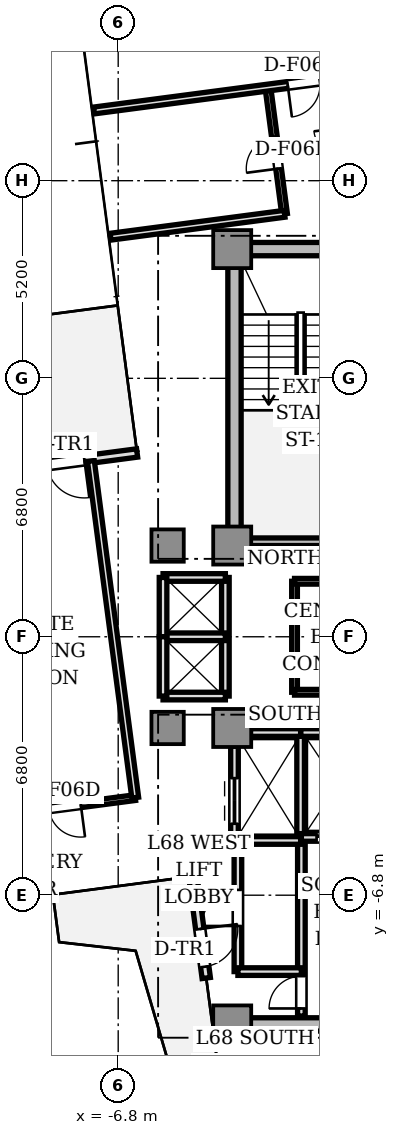
"""IFC4 building model, lengths in metres.
Left out: names, types, materials, properties, quantities, classifications, styles, units other than length and angle.
Written with IfcOpenShell. Run it as: python <this file> out.ifc"""

import sys

from ifc_helpers import new_model, si_unit, direction, frame, frame_2d, origin, origin_2d, place, context, subcontext, project, spatial, rectangle, extrude, source, transform, mapped, element, fill, save


model = new_model("IFC4")
c1 = context("Model", 3, precision=1e-05, world=origin(), true_north=direction((0.0, 1.0)))
c2 = subcontext(c1, "Body", "Model", "MODEL_VIEW")
j1 = project(units=[si_unit("LENGTHUNIT", "METRE"), si_unit("PLANEANGLEUNIT", "RADIAN")], contexts=[c1])
p1 = place(None, origin())
s1 = spatial("IfcSite", under=j1, at=p1, CompositionType="ELEMENT")
p2 = place(p1, origin())
s2 = spatial("IfcBuilding", under=s1, at=p2, CompositionType="ELEMENT")
p3 = place(p2, frame((0.0, 0.0, 244.5)))
s3 = spatial("IfcBuildingStorey", under=s2, at=p3, CompositionType="ELEMENT", Elevation=244.5)
p4 = place(p3, frame((-3.55, 10.2, 0.0), z_axis=(0.0, 0.0, 1.0), x_axis=(1.0, 0.0, 0.0)))
e1 = element("IfcWall", 1, at=p4, inside=s3, PredefinedType="SHEAR", context=c2, shape_type="SweptSolid", body=[
    extrude(rectangle(XDim=7.1, YDim=0.35, at=frame_2d((3.55, 0.0))), origin(), (0.0, 0.0, 1.0), 3.11),
])
p5 = place(p3, frame((-3.74, 2.85, 0.0), z_axis=(0.0, 0.0, 1.0), x_axis=(0.0, 1.0, 0.0)))
e2 = element("IfcWall", 2, at=p5, inside=s3, PredefinedType="SHEAR", context=c2, shape_type="SweptSolid", body=[
    extrude(rectangle(XDim=6.9, YDim=0.35, at=frame_2d((3.45, 0.0))), origin(), (0.0, 0.0, 1.0), 3.11),
])
p6 = place(p3, frame((-3.55, -10.2, 0.0), z_axis=(0.0, 0.0, 1.0), x_axis=(1.0, 0.0, 0.0)))
e3 = element("IfcWall", 3, at=p6, inside=s3, PredefinedType="SHEAR", context=c2, shape_type="SweptSolid", body=[
    extrude(rectangle(XDim=7.1, YDim=0.35, at=frame_2d((3.55, 0.0))), origin(), (0.0, 0.0, 1.0), 3.11),
])
m1 = source(origin(), c2, "Body", "SweptSolid", [
    extrude(rectangle(XDim=1.0, YDim=1.0, at=origin_2d()), origin(), (0.0, 0.0, 1.0), 3.11),
])
for number, where, z_axis, x_axis in (
    (4, (-3.8, 2.4, 0.0), (0.0, 0.0, 1.0), (1.0, 0.0, 0.0)),
    (5, (-3.8, 10.2, 0.0), (0.0, 0.0, 1.0), (1.0, 0.0, 0.0)),
    (6, (-3.8, -2.4, 0.0), (0.0, 0.0, 1.0), (1.0, 0.0, 0.0)),
    (7, (-3.8, -10.2, 0.0), (0.0, 0.0, 1.0), (1.0, 0.0, 0.0)),
):
    element("IfcColumn", number, at=place(p3, frame(where, z_axis=z_axis, x_axis=x_axis)), inside=s3, PredefinedType="COLUMN", context=c2, shape_type="MappedRepresentation", body=[
        mapped(m1, transform((0.0, 0.0, 0.0), scale=1.0)),
    ])
m2 = source(origin(), c2, "Body", "SweptSolid", [
    extrude(rectangle(XDim=0.85, YDim=0.85, at=origin_2d()), origin(), (0.0, 0.0, 1.0), 3.11),
])
for number, where, z_axis, x_axis in (
    (8, (-5.5, 2.4, 0.0), (0.0, 0.0, 1.0), (1.0, 0.0, 0.0)),
    (9, (-5.5, -2.4, 0.0), (0.0, 0.0, 1.0), (1.0, 0.0, 0.0)),
):
    element("IfcColumn", number, at=place(p3, frame(where, z_axis=z_axis, x_axis=x_axis)), inside=s3, PredefinedType="COLUMN", context=c2, shape_type="MappedRepresentation", body=[
        mapped(m2, transform((0.0, 0.0, 0.0), scale=1.0)),
    ])
p7 = place(p3, frame((-6.302, 4.836, 0.0), z_axis=(0.0, 0.0, 1.0), x_axis=(-0.991451525486, -0.130475563272, 0.0)))
e10 = element("IfcWall", 10, at=p7, inside=s3, PredefinedType="STANDARD", context=c2, shape_type="SweptSolid", body=[
    extrude(rectangle(XDim=2.7, YDim=0.22, at=frame_2d((1.35, 0.0))), origin(), (0.0, 0.0, 1.0), 3.11),
])
p8 = place(p7, frame((1.4, 0.0, 0.0)))
e11 = element("IfcOpeningElement", 11, at=p8, cuts=e10, PredefinedType="OPENING", context=c2, shape_type="SweptSolid", body=[
    extrude(rectangle(XDim=1.0, YDim=2.2, at=frame_2d((0.5, 1.1))), frame((0.0, 0.12, 0.0), z_axis=(0.0, -1.0, 0.0), x_axis=(1.0, 0.0, 0.0)), (0.0, 0.0, 1.0), 0.24),
])
p9 = place(p3, frame((-4.836, -6.302, 0.0), z_axis=(0.0, 0.0, 1.0), x_axis=(0.130475563272, -0.991451525486, 0.0)))
e12 = element("IfcWall", 12, at=p9, inside=s3, PredefinedType="STANDARD", context=c2, shape_type="SweptSolid", body=[
    extrude(rectangle(XDim=2.7, YDim=0.22, at=frame_2d((1.35, 0.0))), origin(), (0.0, 0.0, 1.0), 3.11),
])
p10 = place(p9, frame((1.4, 0.0, 0.0)))
e13 = element("IfcOpeningElement", 13, at=p10, cuts=e12, PredefinedType="OPENING", context=c2, shape_type="SweptSolid", body=[
    extrude(rectangle(XDim=1.0, YDim=2.2, at=frame_2d((0.5, 1.1))), frame((0.0, 0.12, 0.0), z_axis=(0.0, -1.0, 0.0), x_axis=(1.0, 0.0, 0.0)), (0.0, 0.0, 1.0), 0.24),
])
p11 = place(p3, frame((-3.72, 2.5, 0.0), z_axis=(0.0, 0.0, 1.0), x_axis=(1.0, 0.0, 0.0)))
e14 = element("IfcWall", 14, at=p11, inside=s3, PredefinedType="SOLIDWALL", context=c2, shape_type="SweptSolid", body=[
    extrude(rectangle(XDim=3.72, YDim=0.2, at=frame_2d((1.86, 0.0))), origin(), (0.0, 0.0, 1.0), 3.11),
])
p12 = place(p3, frame((-1.98, -9.98, 0.0), z_axis=(0.0, 0.0, 1.0), x_axis=(0.0, 1.0, 0.0)))
e15 = element("IfcWall", 15, at=p12, inside=s3, PredefinedType="SOLIDWALL", context=c2, shape_type="SweptSolid", body=[
    extrude(rectangle(XDim=4.66, YDim=0.2, at=frame_2d((2.33, 0.0))), origin(), (0.0, 0.0, 1.0), 2.66),
])
p13 = place(p12, frame((0.2, 0.0, 0.0)))
e16 = element("IfcOpeningElement", 16, at=p13, cuts=e15, PredefinedType="OPENING", context=c2, shape_type="SweptSolid", body=[
    extrude(rectangle(XDim=0.85, YDim=2.1, at=frame_2d((0.425, 1.05))), frame((0.0, 0.11, 0.0), z_axis=(0.0, -1.0, 0.0), x_axis=(1.0, 0.0, 0.0)), (0.0, 0.0, 1.0), 0.22),
])
p14 = place(p3, frame((-2.0, -5.28, 0.0), z_axis=(0.0, 0.0, 1.0), x_axis=(0.0, 1.0, 0.0)))
e17 = element("IfcWall", 17, at=p14, inside=s3, PredefinedType="SOLIDWALL", context=c2, shape_type="SweptSolid", body=[
    extrude(rectangle(XDim=2.78, YDim=0.2, at=frame_2d((1.39, 0.0))), origin(), (0.0, 0.0, 1.0), 2.66),
])
p15 = place(p3, frame((-2.0, -2.52, 0.0), z_axis=(0.0, 0.0, 1.0), x_axis=(1.0, 0.0, 0.0)))
e18 = element("IfcWall", 18, at=p15, inside=s3, PredefinedType="SOLIDWALL", context=c2, shape_type="SweptSolid", body=[
    extrude(rectangle(XDim=1.95, YDim=0.2, at=frame_2d((0.975, 0.0))), origin(), (0.0, 0.0, 1.0), 2.66),
])
p16 = place(p3, frame((-1.98, -5.28, 0.0), z_axis=(0.0, 0.0, 1.0), x_axis=(1.0, 0.0, 0.0)))
e19 = element("IfcWall", 19, at=p16, inside=s3, PredefinedType="SOLIDWALL", context=c2, shape_type="SweptSolid", body=[
    extrude(rectangle(XDim=1.93, YDim=0.2, at=frame_2d((0.965, 0.0))), origin(), (0.0, 0.0, 1.0), 2.66),
])
p17 = place(p16, frame((0.4, 0.0, 0.0)))
e20 = element("IfcOpeningElement", 20, at=p17, cuts=e19, PredefinedType="OPENING", context=c2, shape_type="SweptSolid", body=[
    extrude(rectangle(XDim=1.1, YDim=2.2, at=frame_2d((0.55, 1.1))), frame((0.0, 0.11, 0.0), z_axis=(0.0, -1.0, 0.0), x_axis=(1.0, 0.0, 0.0)), (0.0, 0.0, 1.0), 0.22),
])
p18 = place(p3, frame((-3.32, -2.52, 0.0), z_axis=(0.0, 0.0, 1.0), x_axis=(1.0, 0.0, 0.0)))
e21 = element("IfcWall", 21, at=p18, inside=s3, PredefinedType="SOLIDWALL", context=c2, shape_type="SweptSolid", body=[
    extrude(rectangle(XDim=1.32, YDim=0.2, at=frame_2d((0.66, 0.0))), origin(), (0.0, 0.0, 1.0), 2.66),
])
p19 = place(p3, frame((-3.74, -5.36, 0.0), z_axis=(0.0, 0.0, 1.0), x_axis=(1.0, 0.0, 0.0)))
e22 = element("IfcWall", 22, at=p19, inside=s3, PredefinedType="SOLIDWALL", context=c2, shape_type="SweptSolid", body=[
    extrude(rectangle(XDim=1.74, YDim=0.2, at=frame_2d((0.87, 0.0))), origin(), (0.0, 0.0, 1.0), 2.66),
])
p20 = place(p3, frame((-3.74, -5.36, 0.0), z_axis=(0.0, 0.0, 1.0), x_axis=(0.0, 1.0, 0.0)))
e23 = element("IfcWall", 23, at=p20, inside=s3, PredefinedType="SOLIDWALL", context=c2, shape_type="SweptSolid", body=[
    extrude(rectangle(XDim=2.48, YDim=0.2, at=frame_2d((1.24, 0.0))), origin(), (0.0, 0.0, 1.0), 2.66),
])
p21 = place(p20, frame((0.44, 0.0, 0.0)))
e24 = element("IfcOpeningElement", 24, at=p21, cuts=e23, PredefinedType="OPENING", context=c2, shape_type="SweptSolid", body=[
    extrude(rectangle(XDim=1.2, YDim=2.2, at=frame_2d((0.6, 1.1))), frame((0.0, 0.11, 0.0), z_axis=(0.0, -1.0, 0.0), x_axis=(1.0, 0.0, 0.0)), (0.0, 0.0, 1.0), 0.22),
])
p22 = place(p3, frame((-3.98, -1.56, 0.0), z_axis=(0.0, 0.0, 1.0), x_axis=(0.0, 1.0, 0.0)))
e25 = element("IfcWall", 25, at=p22, inside=s3, PredefinedType="SOLIDWALL", context=c2, shape_type="SweptSolid", body=[
    extrude(rectangle(XDim=3.12, YDim=0.2, at=frame_2d((1.56, 0.0))), origin(), (0.0, 0.0, 1.0), 2.33),
])
for number, where, z_axis, x_axis in (
    (26, (-5.62, 1.56, 0.0), (0.0, 0.0, 1.0), (1.0, 0.0, 0.0)),
    (27, (-5.62, -1.56, 0.0), (0.0, 0.0, 1.0), (1.0, 0.0, 0.0)),
    (28, (-5.62, 0.0, 0.0), (0.0, 0.0, 1.0), (1.0, 0.0, 0.0)),
):
    element("IfcWall", number, at=place(p3, frame(where, z_axis=z_axis, x_axis=x_axis)), inside=s3, PredefinedType="SOLIDWALL", context=c2, shape_type="SweptSolid", body=[
        extrude(rectangle(XDim=1.64, YDim=0.2, at=frame_2d((0.82, 0.0))), origin(), (0.0, 0.0, 1.0), 2.66),
    ])
for number, where, z_axis, x_axis in (
    (29, (-5.62, 0.0, 0.0), (0.0, 0.0, 1.0), (0.0, 1.0, 0.0)),
    (30, (-5.62, -1.56, 0.0), (0.0, 0.0, 1.0), (0.0, 1.0, 0.0)),
):
    element("IfcWall", number, at=place(p3, frame(where, z_axis=z_axis, x_axis=x_axis)), inside=s3, PredefinedType="SOLIDWALL", context=c2, shape_type="SweptSolid", body=[
        extrude(rectangle(XDim=1.56, YDim=0.2, at=frame_2d((0.78, 0.0))), origin(), (0.0, 0.0, 1.0), 2.66),
    ])
p23 = place(p3, frame((-3.65, -8.81, 0.0), z_axis=(0.0, 0.0, 1.0), x_axis=(0.0, 1.0, 0.0)))
e31 = element("IfcWall", 31, at=p23, inside=s3, PredefinedType="SOLIDWALL", context=c2, shape_type="SweptSolid", body=[
    extrude(rectangle(XDim=3.43, YDim=0.2, at=frame_2d((1.715, 0.0))), origin(), (0.0, 0.0, 1.0), 2.66),
])
p24 = place(p23, frame((1.2, 0.0, 0.0)))
e32 = element("IfcOpeningElement", 32, at=p24, cuts=e31, PredefinedType="OPENING", context=c2, shape_type="SweptSolid", body=[
    extrude(rectangle(XDim=0.95, YDim=2.15, at=frame_2d((0.475, 1.075))), frame((0.0, 0.11, 0.0), z_axis=(0.0, -1.0, 0.0), x_axis=(1.0, 0.0, 0.0)), (0.0, 0.0, 1.0), 0.22),
])
p25 = place(p3, frame((-3.65, -8.81, 0.0), z_axis=(0.0, 0.0, 1.0), x_axis=(1.0, 0.0, 0.0)))
e33 = element("IfcWall", 33, at=p25, inside=s3, PredefinedType="SOLIDWALL", context=c2, shape_type="SweptSolid", body=[
    extrude(rectangle(XDim=1.67, YDim=0.2, at=frame_2d((0.835, 0.0))), origin(), (0.0, 0.0, 1.0), 2.66),
])
p26 = place(p3, frame((-2.16, -1.46, 0.0), z_axis=(0.0, 0.0, 1.0), x_axis=(0.0, 1.0, 0.0)))
e34 = element("IfcWall", 34, at=p26, inside=s3, PredefinedType="PARTITIONING", context=c2, shape_type="SweptSolid", body=[
    extrude(rectangle(XDim=2.92, YDim=0.15, at=frame_2d((1.46, 0.0))), origin(), (0.0, 0.0, 1.0), 2.66),
])
p27 = place(p3, frame((-2.16, 1.46, 0.0), z_axis=(0.0, 0.0, 1.0), x_axis=(1.0, 0.0, 0.0)))
e35 = element("IfcWall", 35, at=p27, inside=s3, PredefinedType="PARTITIONING", context=c2, shape_type="SweptSolid", body=[
    extrude(rectangle(XDim=4.32, YDim=0.15, at=frame_2d((2.16, 0.0))), origin(), (0.0, 0.0, 1.0), 2.66),
])
p28 = place(p27, frame((1.73, 0.0, 0.0)))
e36 = element("IfcOpeningElement", 36, at=p28, cuts=e35, PredefinedType="OPENING", context=c2, shape_type="SweptSolid", body=[
    extrude(rectangle(XDim=0.85, YDim=2.1, at=frame_2d((0.425, 1.05))), frame((0.0, 0.085, 0.0), z_axis=(0.0, -1.0, 0.0), x_axis=(1.0, 0.0, 0.0)), (0.0, 0.0, 1.0), 0.17),
])
p29 = place(p3, frame((-2.16, -1.46, 0.0), z_axis=(0.0, 0.0, 1.0), x_axis=(1.0, 0.0, 0.0)))
e37 = element("IfcWall", 37, at=p29, inside=s3, PredefinedType="PARTITIONING", context=c2, shape_type="SweptSolid", body=[
    extrude(rectangle(XDim=4.32, YDim=0.15, at=frame_2d((2.16, 0.0))), origin(), (0.0, 0.0, 1.0), 2.66),
])
p30 = place(p29, frame((1.73, 0.0, 0.0)))
e38 = element("IfcOpeningElement", 38, at=p30, cuts=e37, PredefinedType="OPENING", context=c2, shape_type="SweptSolid", body=[
    extrude(rectangle(XDim=0.85, YDim=2.1, at=frame_2d((0.425, 1.05))), frame((0.0, 0.085, 0.0), z_axis=(0.0, -1.0, 0.0), x_axis=(1.0, 0.0, 0.0)), (0.0, 0.0, 1.0), 0.17),
])
for number, where, z_axis, x_axis in (
    (39, (-2.16, 0.66, 0.0), (0.0, 0.0, 1.0), (1.0, 0.0, 0.0)),
    (40, (-2.16, -0.66, 0.0), (0.0, 0.0, 1.0), (1.0, 0.0, 0.0)),
):
    element("IfcWall", number, at=place(p3, frame(where, z_axis=z_axis, x_axis=x_axis)), inside=s3, PredefinedType="PARTITIONING", context=c2, shape_type="SweptSolid", body=[
        extrude(rectangle(XDim=4.32, YDim=0.15, at=frame_2d((2.16, 0.0))), origin(), (0.0, 0.0, 1.0), 2.66),
    ])
p31 = place(p3, frame((-2.423, 11.129, 0.0), z_axis=(0.0, 0.0, 1.0), x_axis=(-0.130526150873, 0.991444866817, 0.0)))
e41 = element("IfcWall", 41, at=p31, inside=s3, PredefinedType="PARTITIONING", context=c2, shape_type="SweptSolid", body=[
    extrude(rectangle(XDim=3.35, YDim=0.15, at=frame_2d((1.675, 0.0))), origin(), (0.0, 0.0, 1.0), 2.66),
])
p32 = place(p31, frame((1.2, 0.0, 0.0)))
e42 = element("IfcOpeningElement", 42, at=p32, cuts=e41, PredefinedType="OPENING", context=c2, shape_type="SweptSolid", body=[
    extrude(rectangle(XDim=0.85, YDim=2.1, at=frame_2d((0.425, 1.05))), frame((0.0, 0.085, 0.0), z_axis=(0.0, -1.0, 0.0), x_axis=(1.0, 0.0, 0.0)), (0.0, 0.0, 1.0), 0.17),
])
p33 = place(p3, frame((-2.423, 11.129, 0.0), z_axis=(0.0, 0.0, 1.0), x_axis=(-0.991447274637, -0.130507860355, 0.0)))
e43 = element("IfcWall", 43, at=p33, inside=s3, PredefinedType="PARTITIONING", context=c2, shape_type="SweptSolid", body=[
    extrude(rectangle(XDim=4.617, YDim=0.18, at=frame_2d((2.309, 0.0))), origin(), (0.0, 0.0, 1.0), 2.66),
])
p34 = place(p3, frame((3.601, 15.301, 0.0), z_axis=(0.0, 0.0, 1.0), x_axis=(-0.991446382373, -0.130514638561, 0.0)))
e44 = element("IfcWall", 44, at=p34, inside=s3, PredefinedType="PARTITIONING", context=c2, shape_type="SweptSolid", body=[
    extrude(rectangle(XDim=11.134, YDim=0.18, at=frame_2d((5.567, 0.0))), origin(), (0.0, 0.0, 1.0), 2.66),
])
p35 = place(p34, frame((5.142, 0.0, 0.0)))
e45 = element("IfcOpeningElement", 45, at=p35, cuts=e44, PredefinedType="OPENING", context=c2, shape_type="SweptSolid", body=[
    extrude(rectangle(XDim=0.85, YDim=2.1, at=frame_2d((0.425, 1.05))), frame((0.0, 0.1, 0.0), z_axis=(0.0, -1.0, 0.0), x_axis=(1.0, 0.0, 0.0)), (0.0, 0.0, 1.0), 0.2),
])
p36 = place(p3, frame((-6.352, -4.232, 0.0), z_axis=(0.0, 0.0, 1.0), x_axis=(-0.991446823881, -0.130511284629, 0.0)))
e46 = element("IfcWall", 46, at=p36, inside=s3, PredefinedType="PARTITIONING", context=c2, shape_type="SweptSolid", body=[
    extrude(rectangle(XDim=8.343, YDim=0.15, at=frame_2d((4.171, 0.0))), origin(), (0.0, 0.0, 1.0), 2.66),
])
p37 = place(p36, frame((1.444, 0.0, 0.0)))
e47 = element("IfcOpeningElement", 47, at=p37, cuts=e46, PredefinedType="OPENING", context=c2, shape_type="SweptSolid", body=[
    extrude(rectangle(XDim=0.85, YDim=2.1, at=frame_2d((0.425, 1.05))), frame((0.0, 0.085, 0.0), z_axis=(0.0, -1.0, 0.0), x_axis=(1.0, 0.0, 0.0)), (0.0, 0.0, 1.0), 0.17),
])
p38 = place(p36, frame((4.641, 0.0, 0.0)))
e48 = element("IfcOpeningElement", 48, at=p38, cuts=e46, PredefinedType="OPENING", context=c2, shape_type="SweptSolid", body=[
    extrude(rectangle(XDim=0.85, YDim=2.1, at=frame_2d((0.425, 1.05))), frame((0.0, 0.085, 0.0), z_axis=(0.0, -1.0, 0.0), x_axis=(1.0, 0.0, 0.0)), (0.0, 0.0, 1.0), 0.17),
])
p39 = place(p3, frame((-7.518, 4.625, 0.0), z_axis=(0.0, 0.0, 1.0), x_axis=(0.130540045477, -0.991443037459, 0.0)))
e49 = element("IfcWall", 49, at=p39, inside=s3, PredefinedType="PARTITIONING", context=c2, shape_type="SweptSolid", body=[
    extrude(rectangle(XDim=8.934, YDim=0.18, at=frame_2d((4.467, 0.0))), origin(), (0.0, 0.0, 1.0), 2.66),
])
p40 = place(p3, frame((-4.038, -11.979, 0.0), z_axis=(0.0, 0.0, 1.0), x_axis=(0.991446382373, 0.130514638561, 0.0)))
e50 = element("IfcWall", 50, at=p40, inside=s3, PredefinedType="PARTITIONING", context=c2, shape_type="SweptSolid", body=[
    extrude(rectangle(XDim=11.134, YDim=0.15, at=frame_2d((5.567, 0.0))), origin(), (0.0, 0.0, 1.0), 2.66),
])
p41 = place(p40, frame((4.767, 0.0, 0.0)))
e51 = element("IfcOpeningElement", 51, at=p41, cuts=e50, PredefinedType="OPENING", context=c2, shape_type="SweptSolid", body=[
    extrude(rectangle(XDim=1.6, YDim=2.25, at=frame_2d((0.8, 1.125))), frame((0.0, 0.085, 0.0), z_axis=(0.0, -1.0, 0.0), x_axis=(1.0, 0.0, 0.0)), (0.0, 0.0, 1.0), 0.17),
])
m3 = source(origin(), c2, "Body", "SweptSolid", [
    extrude(rectangle(XDim=1.0, YDim=0.05, at=origin_2d()), origin(), (0.0, 0.0, 1.0), 2.2),
])
p42 = place(p8, frame((0.5, 0.0, 0.0)))
e52 = element("IfcDoor", 52, at=p42, inside=s3, OperationType="SINGLE_SWING_LEFT", PredefinedType="DOOR", context=c2, shape_type="MappedRepresentation", body=[
    mapped(m3, transform((0.0, 0.0, 0.0), scale=1.0)),
])
fill(e11, e52)
p43 = place(p10, frame((0.5, 0.0, 0.0)))
e53 = element("IfcDoor", 53, at=p43, inside=s3, OperationType="SINGLE_SWING_LEFT", PredefinedType="DOOR", context=c2, shape_type="MappedRepresentation", body=[
    mapped(m3, transform((0.0, 0.0, 0.0), scale=1.0)),
])
fill(e13, e53)
m4 = source(origin(), c2, "Body", "SweptSolid", [
    extrude(rectangle(XDim=0.85, YDim=0.05, at=origin_2d()), origin(), (0.0, 0.0, 1.0), 2.1),
])
p44 = place(p13, frame((0.425, 0.0, 0.0)))
e54 = element("IfcDoor", 54, at=p44, inside=s3, OperationType="SINGLE_SWING_LEFT", PredefinedType="DOOR", context=c2, shape_type="MappedRepresentation", body=[
    mapped(m4, transform((0.0, 0.0, 0.0), scale=1.0)),
])
fill(e16, e54)
m5 = source(origin(), c2, "Body", "SweptSolid", [
    extrude(rectangle(XDim=1.1, YDim=0.05, at=origin_2d()), origin(), (0.0, 0.0, 1.0), 2.2),
])
p45 = place(p17, frame((0.55, 0.0, 0.0)))
e55 = element("IfcDoor", 55, at=p45, inside=s3, OperationType="DOUBLE_DOOR_SLIDING", PredefinedType="DOOR", context=c2, shape_type="MappedRepresentation", body=[
    mapped(m5, transform((0.0, 0.0, 0.0), scale=1.0)),
])
fill(e20, e55)
m6 = source(origin(), c2, "Body", "SweptSolid", [
    extrude(rectangle(XDim=1.2, YDim=0.05, at=origin_2d()), origin(), (0.0, 0.0, 1.0), 2.2),
])
p46 = place(p21, frame((0.6, 0.0, 0.0)))
e56 = element("IfcDoor", 56, at=p46, inside=s3, OperationType="DOUBLE_DOOR_SLIDING", PredefinedType="DOOR", context=c2, shape_type="MappedRepresentation", body=[
    mapped(m6, transform((0.0, 0.0, 0.0), scale=1.0)),
])
fill(e24, e56)
m7 = source(origin(), c2, "Body", "SweptSolid", [
    extrude(rectangle(XDim=0.95, YDim=0.05, at=origin_2d()), origin(), (0.0, 0.0, 1.0), 2.15),
])
p47 = place(p24, frame((0.475, 0.0, 0.0)))
e57 = element("IfcDoor", 57, at=p47, inside=s3, OperationType="SINGLE_SWING_LEFT", PredefinedType="DOOR", context=c2, shape_type="MappedRepresentation", body=[
    mapped(m7, transform((0.0, 0.0, 0.0), scale=1.0)),
])
fill(e32, e57)
p48 = place(p32, frame((0.425, 0.0, 0.0)))
e58 = element("IfcDoor", 58, at=p48, inside=s3, OperationType="SINGLE_SWING_LEFT", PredefinedType="DOOR", context=c2, shape_type="MappedRepresentation", body=[
    mapped(m4, transform((0.0, 0.0, 0.0), scale=1.0)),
])
fill(e42, e58)
p49 = place(p35, frame((0.425, 0.0, 0.0)))
e59 = element("IfcDoor", 59, at=p49, inside=s3, OperationType="SINGLE_SWING_RIGHT", PredefinedType="DOOR", context=c2, shape_type="MappedRepresentation", body=[
    mapped(m4, transform((0.0, 0.0, 0.0), scale=1.0)),
])
fill(e45, e59)
p50 = place(p37, frame((0.425, 0.0, 0.0)))
e60 = element("IfcDoor", 60, at=p50, inside=s3, OperationType="SINGLE_SWING_LEFT", PredefinedType="DOOR", context=c2, shape_type="MappedRepresentation", body=[
    mapped(m4, transform((0.0, 0.0, 0.0), scale=1.0)),
])
fill(e47, e60)
save(model, sys.argv[1])
